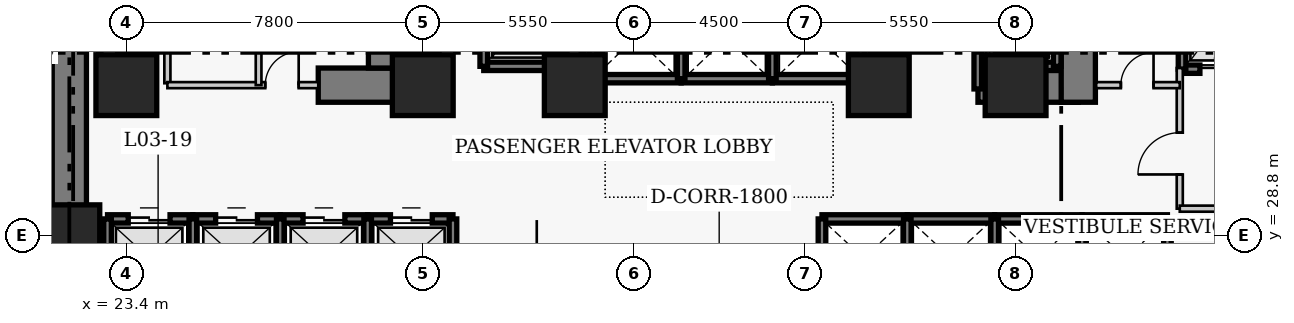
"""IFC4 building model, lengths in metres.
Left out: names, types, materials, properties, quantities, classifications, styles, units other than length and angle.
Written with IfcOpenShell. Run it as: python <this file> out.ifc"""

import sys

from ifc_helpers import new_model, si_unit, direction, frame, frame_2d, origin, origin_2d, place, context, subcontext, project, spatial, rectangle, extrude, element, fill, save


model = new_model("IFC4")
c1 = context("Model", 3, precision=1e-05, world=origin(), true_north=direction((0.0, 1.0)))
c2 = subcontext(c1, "Body", "Model", "MODEL_VIEW")
j1 = project(units=[si_unit("LENGTHUNIT", "METRE"), si_unit("PLANEANGLEUNIT", "RADIAN")], contexts=[c1])
p1 = place(None, origin())
s1 = spatial("IfcSite", under=j1, at=p1, CompositionType="ELEMENT")
p2 = place(p1, origin())
s2 = spatial("IfcBuilding", under=s1, at=p2, CompositionType="ELEMENT")
p3 = place(p2, frame((0.0, 0.0, 15.8)))
s3 = spatial("IfcBuildingStorey", under=s2, at=p3, CompositionType="ELEMENT", Elevation=15.8)
p4 = place(p3, frame((21.9, 27.05, 0.0), z_axis=(0.0, 0.0, 1.0), x_axis=(0.0, 1.0, 0.0)))
e1 = element("IfcWall", 1, at=p4, inside=s3, PredefinedType="SHEAR", context=c2, shape_type="SweptSolid", body=[
    extrude(rectangle(XDim=13.72, YDim=0.9, at=frame_2d((6.86, 0.0))), origin(), (0.0, 0.0, 1.0), 5.0),
])
p5 = place(p3, frame((28.45, 32.75, 0.0), z_axis=(0.0, 0.0, 1.0), x_axis=(1.0, 0.0, 0.0)))
e2 = element("IfcWall", 2, at=p5, inside=s3, PredefinedType="SHEAR", context=c2, shape_type="SweptSolid", body=[
    extrude(rectangle(XDim=2.4, YDim=0.9, at=frame_2d((1.2, 0.0))), origin(), (0.0, 0.0, 1.0), 5.0),
])
p6 = place(p3, frame((45.81, 32.75, 0.0), z_axis=(0.0, 0.0, 1.0), x_axis=(1.0, 0.0, 0.0)))
e3 = element("IfcWall", 3, at=p6, inside=s3, PredefinedType="SHEAR", context=c2, shape_type="SweptSolid", body=[
    extrude(rectangle(XDim=2.64, YDim=0.9, at=frame_2d((1.32, 0.0))), origin(), (0.0, 0.0, 1.0), 5.0),
])
p7 = place(p3, frame((30.22, 33.2, 0.0), z_axis=(0.0, 0.0, 1.0), x_axis=(0.0, 1.0, 0.0)))
e4 = element("IfcWall", 4, at=p7, inside=s3, PredefinedType="SHEAR", context=c2, shape_type="SweptSolid", body=[
    extrude(rectangle(XDim=7.12, YDim=0.9, at=frame_2d((3.56, 0.0))), origin(), (0.0, 0.0, 1.0), 5.0),
])
p8 = place(p3, frame((48.45, 32.3, 0.0), z_axis=(0.0, 0.0, 1.0), x_axis=(0.0, 1.0, 0.0)))
e5 = element("IfcWall", 5, at=p8, inside=s3, PredefinedType="SHEAR", context=c2, shape_type="SweptSolid", body=[
    extrude(rectangle(XDim=8.02, YDim=0.9, at=frame_2d((4.01, 0.0))), origin(), (0.0, 0.0, 1.0), 5.0),
])
p9 = place(p8, frame((5.9, 0.0, 0.0)))
e6 = element("IfcOpeningElement", 6, at=p9, cuts=e5, PredefinedType="OPENING", context=c2, shape_type="SweptSolid", body=[
    extrude(rectangle(XDim=1.1, YDim=2.15, at=frame_2d((0.55, 1.075))), frame((0.0, 0.46, 0.0), z_axis=(0.0, -1.0, 0.0), x_axis=(1.0, 0.0, 0.0)), (0.0, 0.0, 1.0), 0.92),
])
for number, where, z_axis, x_axis in (
    (7, (21.9, 28.8, 0.0), (0.0, 0.0, 1.0), (1.0, 0.0, 0.0)),
    (8, (23.4, 32.75, 0.0), (0.0, 0.0, 1.0), (1.0, 0.0, 0.0)),
    (9, (31.2, 32.75, 0.0), (0.0, 0.0, 1.0), (1.0, 0.0, 0.0)),
    (10, (35.2, 32.75, 0.0), (0.0, 0.0, 1.0), (1.0, 0.0, 0.0)),
    (11, (43.2, 32.75, 0.0), (0.0, 0.0, 1.0), (1.0, 0.0, 0.0)),
    (12, (46.8, 32.75, 0.0), (0.0, 0.0, 1.0), (1.0, 0.0, 0.0)),
):
    element("IfcColumn", number, at=place(p3, frame(where, z_axis=z_axis, x_axis=x_axis)), inside=s3, PredefinedType="COLUMN", context=c2, shape_type="SweptSolid", body=[
        extrude(rectangle(XDim=1.6, YDim=1.6, at=origin_2d()), origin(), (0.0, 0.0, 1.0), 5.0),
    ])
p10 = place(p3, frame((22.905, 29.23, 0.0), z_axis=(0.0, 0.0, 1.0), x_axis=(1.0, 0.0, 0.0)))
e13 = element("IfcWall", 13, at=p10, inside=s3, PredefinedType="SHEAR", context=c2, shape_type="SweptSolid", body=[
    extrude(rectangle(XDim=2.245, YDim=0.22, at=frame_2d((1.123, 0.0))), origin(), (0.0, 0.0, 1.0), 5.0),
])
p11 = place(p10, frame((0.545, 0.0, 0.0)))
e14 = element("IfcOpeningElement", 14, at=p11, cuts=e13, PredefinedType="OPENING", context=c2, shape_type="SweptSolid", body=[
    extrude(rectangle(XDim=1.1, YDim=2.15, at=frame_2d((0.55, 1.075))), frame((0.0, 0.12, 0.0), z_axis=(0.0, -1.0, 0.0), x_axis=(1.0, 0.0, 0.0)), (0.0, 0.0, 1.0), 0.24),
])
p12 = place(p3, frame((22.905, 27.17, 0.0), z_axis=(0.0, 0.0, 1.0), x_axis=(0.0, 1.0, 0.0)))
e15 = element("IfcWall", 15, at=p12, inside=s3, PredefinedType="SHEAR", context=c2, shape_type="SweptSolid", body=[
    extrude(rectangle(XDim=2.06, YDim=0.2, at=frame_2d((1.03, 0.0))), origin(), (0.0, 0.0, 1.0), 5.0),
])
p13 = place(p3, frame((25.15, 29.23, 0.0), z_axis=(0.0, 0.0, 1.0), x_axis=(1.0, 0.0, 0.0)))
e16 = element("IfcWall", 16, at=p13, inside=s3, PredefinedType="SHEAR", context=c2, shape_type="SweptSolid", body=[
    extrude(rectangle(XDim=2.3, YDim=0.22, at=frame_2d((1.15, 0.0))), origin(), (0.0, 0.0, 1.0), 5.0),
])
p14 = place(p13, frame((0.6, 0.0, 0.0)))
e17 = element("IfcOpeningElement", 17, at=p14, cuts=e16, PredefinedType="OPENING", context=c2, shape_type="SweptSolid", body=[
    extrude(rectangle(XDim=1.1, YDim=2.15, at=frame_2d((0.55, 1.075))), frame((0.0, 0.12, 0.0), z_axis=(0.0, -1.0, 0.0), x_axis=(1.0, 0.0, 0.0)), (0.0, 0.0, 1.0), 0.24),
])
p15 = place(p3, frame((25.15, 27.17, 0.0), z_axis=(0.0, 0.0, 1.0), x_axis=(0.0, 1.0, 0.0)))
e18 = element("IfcWall", 18, at=p15, inside=s3, PredefinedType="SHEAR", context=c2, shape_type="SweptSolid", body=[
    extrude(rectangle(XDim=2.06, YDim=0.2, at=frame_2d((1.03, 0.0))), origin(), (0.0, 0.0, 1.0), 5.0),
])
p16 = place(p3, frame((27.45, 29.23, 0.0), z_axis=(0.0, 0.0, 1.0), x_axis=(1.0, 0.0, 0.0)))
e19 = element("IfcWall", 19, at=p16, inside=s3, PredefinedType="SHEAR", context=c2, shape_type="SweptSolid", body=[
    extrude(rectangle(XDim=2.3, YDim=0.22, at=frame_2d((1.15, 0.0))), origin(), (0.0, 0.0, 1.0), 5.0),
])
p17 = place(p16, frame((0.6, 0.0, 0.0)))
e20 = element("IfcOpeningElement", 20, at=p17, cuts=e19, PredefinedType="OPENING", context=c2, shape_type="SweptSolid", body=[
    extrude(rectangle(XDim=1.1, YDim=2.15, at=frame_2d((0.55, 1.075))), frame((0.0, 0.12, 0.0), z_axis=(0.0, -1.0, 0.0), x_axis=(1.0, 0.0, 0.0)), (0.0, 0.0, 1.0), 0.24),
])
p18 = place(p3, frame((27.45, 27.17, 0.0), z_axis=(0.0, 0.0, 1.0), x_axis=(0.0, 1.0, 0.0)))
e21 = element("IfcWall", 21, at=p18, inside=s3, PredefinedType="SHEAR", context=c2, shape_type="SweptSolid", body=[
    extrude(rectangle(XDim=2.06, YDim=0.2, at=frame_2d((1.03, 0.0))), origin(), (0.0, 0.0, 1.0), 5.0),
])
p19 = place(p3, frame((29.75, 29.23, 0.0), z_axis=(0.0, 0.0, 1.0), x_axis=(1.0, 0.0, 0.0)))
e22 = element("IfcWall", 22, at=p19, inside=s3, PredefinedType="SHEAR", context=c2, shape_type="SweptSolid", body=[
    extrude(rectangle(XDim=2.245, YDim=0.22, at=frame_2d((1.123, 0.0))), origin(), (0.0, 0.0, 1.0), 5.0),
])
p20 = place(p19, frame((0.6, 0.0, 0.0)))
e23 = element("IfcOpeningElement", 23, at=p20, cuts=e22, PredefinedType="OPENING", context=c2, shape_type="SweptSolid", body=[
    extrude(rectangle(XDim=1.1, YDim=2.15, at=frame_2d((0.55, 1.075))), frame((0.0, 0.12, 0.0), z_axis=(0.0, -1.0, 0.0), x_axis=(1.0, 0.0, 0.0)), (0.0, 0.0, 1.0), 0.24),
])
for number, where, z_axis, x_axis in (
    (24, (29.75, 27.17, 0.0), (0.0, 0.0, 1.0), (0.0, 1.0, 0.0)),
    (25, (31.995, 27.17, 0.0), (0.0, 0.0, 1.0), (0.0, 1.0, 0.0)),
):
    element("IfcWall", number, at=place(p3, frame(where, z_axis=z_axis, x_axis=x_axis)), inside=s3, PredefinedType="SHEAR", context=c2, shape_type="SweptSolid", body=[
        extrude(rectangle(XDim=2.06, YDim=0.2, at=frame_2d((1.03, 0.0))), origin(), (0.0, 0.0, 1.0), 5.0),
    ])
p21 = place(p3, frame((41.705, 29.23, 0.0), z_axis=(0.0, 0.0, 1.0), x_axis=(1.0, 0.0, 0.0)))
e26 = element("IfcWall", 26, at=p21, inside=s3, PredefinedType="SHEAR", context=c2, shape_type="SweptSolid", body=[
    extrude(rectangle(XDim=2.245, YDim=0.22, at=frame_2d((1.123, 0.0))), origin(), (0.0, 0.0, 1.0), 5.0),
])
p22 = place(p3, frame((41.705, 27.17, 0.0), z_axis=(0.0, 0.0, 1.0), x_axis=(0.0, 1.0, 0.0)))
e27 = element("IfcWall", 27, at=p22, inside=s3, PredefinedType="SHEAR", context=c2, shape_type="SweptSolid", body=[
    extrude(rectangle(XDim=2.06, YDim=0.2, at=frame_2d((1.03, 0.0))), origin(), (0.0, 0.0, 1.0), 5.0),
])
p23 = place(p3, frame((43.95, 29.23, 0.0), z_axis=(0.0, 0.0, 1.0), x_axis=(1.0, 0.0, 0.0)))
e28 = element("IfcWall", 28, at=p23, inside=s3, PredefinedType="SHEAR", context=c2, shape_type="SweptSolid", body=[
    extrude(rectangle(XDim=2.3, YDim=0.22, at=frame_2d((1.15, 0.0))), origin(), (0.0, 0.0, 1.0), 5.0),
])
p24 = place(p3, frame((43.95, 27.17, 0.0), z_axis=(0.0, 0.0, 1.0), x_axis=(0.0, 1.0, 0.0)))
e29 = element("IfcWall", 29, at=p24, inside=s3, PredefinedType="SHEAR", context=c2, shape_type="SweptSolid", body=[
    extrude(rectangle(XDim=2.06, YDim=0.2, at=frame_2d((1.03, 0.0))), origin(), (0.0, 0.0, 1.0), 5.0),
])
p25 = place(p3, frame((46.25, 29.23, 0.0), z_axis=(0.0, 0.0, 1.0), x_axis=(1.0, 0.0, 0.0)))
e30 = element("IfcWall", 30, at=p25, inside=s3, PredefinedType="SHEAR", context=c2, shape_type="SweptSolid", body=[
    extrude(rectangle(XDim=2.3, YDim=0.22, at=frame_2d((1.15, 0.0))), origin(), (0.0, 0.0, 1.0), 5.0),
])
p26 = place(p3, frame((46.25, 27.17, 0.0), z_axis=(0.0, 0.0, 1.0), x_axis=(0.0, 1.0, 0.0)))
e31 = element("IfcWall", 31, at=p26, inside=s3, PredefinedType="SHEAR", context=c2, shape_type="SweptSolid", body=[
    extrude(rectangle(XDim=2.06, YDim=0.2, at=frame_2d((1.03, 0.0))), origin(), (0.0, 0.0, 1.0), 5.0),
])
p27 = place(p3, frame((48.55, 29.23, 0.0), z_axis=(0.0, 0.0, 1.0), x_axis=(1.0, 0.0, 0.0)))
e32 = element("IfcWall", 32, at=p27, inside=s3, PredefinedType="SHEAR", context=c2, shape_type="SweptSolid", body=[
    extrude(rectangle(XDim=2.245, YDim=0.22, at=frame_2d((1.123, 0.0))), origin(), (0.0, 0.0, 1.0), 5.0),
])
for number, where, z_axis, x_axis in (
    (33, (48.55, 27.17, 0.0), (0.0, 0.0, 1.0), (0.0, 1.0, 0.0)),
    (34, (50.795, 27.17, 0.0), (0.0, 0.0, 1.0), (0.0, 1.0, 0.0)),
):
    element("IfcWall", number, at=place(p3, frame(where, z_axis=z_axis, x_axis=x_axis)), inside=s3, PredefinedType="SHEAR", context=c2, shape_type="SweptSolid", body=[
        extrude(rectangle(XDim=2.06, YDim=0.2, at=frame_2d((1.03, 0.0))), origin(), (0.0, 0.0, 1.0), 5.0),
    ])
p28 = place(p3, frame((35.68, 32.92, 0.0), z_axis=(0.0, 0.0, 1.0), x_axis=(1.0, 0.0, 0.0)))
e35 = element("IfcWall", 35, at=p28, inside=s3, PredefinedType="SHEAR", context=c2, shape_type="SweptSolid", body=[
    extrude(rectangle(XDim=2.32, YDim=0.22, at=frame_2d((1.16, 0.0))), origin(), (0.0, 0.0, 1.0), 5.0),
])
p29 = place(p3, frame((35.68, 32.92, 0.0), z_axis=(0.0, 0.0, 1.0), x_axis=(0.0, 1.0, 0.0)))
e36 = element("IfcWall", 36, at=p29, inside=s3, PredefinedType="SHEAR", context=c2, shape_type="SweptSolid", body=[
    extrude(rectangle(XDim=2.16, YDim=0.2, at=frame_2d((1.08, 0.0))), origin(), (0.0, 0.0, 1.0), 5.0),
])
p30 = place(p3, frame((38.0, 32.92, 0.0), z_axis=(0.0, 0.0, 1.0), x_axis=(1.0, 0.0, 0.0)))
e37 = element("IfcWall", 37, at=p30, inside=s3, PredefinedType="SHEAR", context=c2, shape_type="SweptSolid", body=[
    extrude(rectangle(XDim=2.4, YDim=0.22, at=frame_2d((1.2, 0.0))), origin(), (0.0, 0.0, 1.0), 5.0),
])
p31 = place(p3, frame((38.0, 32.92, 0.0), z_axis=(0.0, 0.0, 1.0), x_axis=(0.0, 1.0, 0.0)))
e38 = element("IfcWall", 38, at=p31, inside=s3, PredefinedType="SHEAR", context=c2, shape_type="SweptSolid", body=[
    extrude(rectangle(XDim=2.16, YDim=0.2, at=frame_2d((1.08, 0.0))), origin(), (0.0, 0.0, 1.0), 5.0),
])
p32 = place(p3, frame((40.4, 32.92, 0.0), z_axis=(0.0, 0.0, 1.0), x_axis=(1.0, 0.0, 0.0)))
e39 = element("IfcWall", 39, at=p32, inside=s3, PredefinedType="SHEAR", context=c2, shape_type="SweptSolid", body=[
    extrude(rectangle(XDim=2.32, YDim=0.22, at=frame_2d((1.16, 0.0))), origin(), (0.0, 0.0, 1.0), 5.0),
])
for number, where, z_axis, x_axis in (
    (40, (40.4, 32.92, 0.0), (0.0, 0.0, 1.0), (0.0, 1.0, 0.0)),
    (41, (42.72, 32.92, 0.0), (0.0, 0.0, 1.0), (0.0, 1.0, 0.0)),
):
    element("IfcWall", number, at=place(p3, frame(where, z_axis=z_axis, x_axis=x_axis)), inside=s3, PredefinedType="SHEAR", context=c2, shape_type="SweptSolid", body=[
        extrude(rectangle(XDim=2.16, YDim=0.2, at=frame_2d((1.08, 0.0))), origin(), (0.0, 0.0, 1.0), 5.0),
    ])
p33 = place(p3, frame((51.18, 33.17, 0.0), z_axis=(0.0, 0.0, 1.0), x_axis=(1.0, 0.0, 0.0)))
e42 = element("IfcWall", 42, at=p33, inside=s3, PredefinedType="SHEAR", context=c2, shape_type="SweptSolid", body=[
    extrude(rectangle(XDim=2.42, YDim=0.22, at=frame_2d((1.21, 0.0))), origin(), (0.0, 0.0, 1.0), 5.0),
])
p34 = place(p33, frame((0.47, 0.0, 0.0)))
e43 = element("IfcOpeningElement", 43, at=p34, cuts=e42, PredefinedType="OPENING", context=c2, shape_type="SweptSolid", body=[
    extrude(rectangle(XDim=1.3, YDim=2.15, at=frame_2d((0.65, 1.075))), frame((0.0, 0.12, 0.0), z_axis=(0.0, -1.0, 0.0), x_axis=(1.0, 0.0, 0.0)), (0.0, 0.0, 1.0), 0.24),
])
p35 = place(p3, frame((51.18, 33.17, 0.0), z_axis=(0.0, 0.0, 1.0), x_axis=(0.0, 1.0, 0.0)))
e44 = element("IfcWall", 44, at=p35, inside=s3, PredefinedType="SHEAR", context=c2, shape_type="SweptSolid", body=[
    extrude(rectangle(XDim=2.86, YDim=0.2, at=frame_2d((1.43, 0.0))), origin(), (0.0, 0.0, 1.0), 5.0),
])
p36 = place(p3, frame((32.805, 33.245, 0.0), z_axis=(0.0, 0.0, 1.0), x_axis=(1.0, 0.0, 0.0)))
e45 = element("IfcWall", 45, at=p36, inside=s3, PredefinedType="SHEAR", context=c2, shape_type="SweptSolid", body=[
    extrude(rectangle(XDim=2.09, YDim=0.22, at=frame_2d((1.045, 0.0))), origin(), (0.0, 0.0, 1.0), 5.0),
])
for number, where, z_axis, x_axis in (
    (46, (32.805, 33.245, 0.0), (0.0, 0.0, 1.0), (0.0, 1.0, 0.0)),
    (47, (34.895, 33.245, 0.0), (0.0, 0.0, 1.0), (0.0, 1.0, 0.0)),
):
    element("IfcWall", number, at=place(p3, frame(where, z_axis=z_axis, x_axis=x_axis)), inside=s3, PredefinedType="SHEAR", context=c2, shape_type="SweptSolid", body=[
        extrude(rectangle(XDim=2.91, YDim=0.2, at=frame_2d((1.455, 0.0))), origin(), (0.0, 0.0, 1.0), 5.0),
    ])
p37 = place(p3, frame((45.805, 33.245, 0.0), z_axis=(0.0, 0.0, 1.0), x_axis=(1.0, 0.0, 0.0)))
e48 = element("IfcWall", 48, at=p37, inside=s3, PredefinedType="SHEAR", context=c2, shape_type="SweptSolid", body=[
    extrude(rectangle(XDim=2.09, YDim=0.22, at=frame_2d((1.045, 0.0))), origin(), (0.0, 0.0, 1.0), 5.0),
])
p38 = place(p3, frame((45.805, 32.65, 0.0), z_axis=(0.0, 0.0, 1.0), x_axis=(0.0, 1.0, 0.0)))
e49 = element("IfcWall", 49, at=p38, inside=s3, PredefinedType="SHEAR", context=c2, shape_type="SweptSolid", body=[
    extrude(rectangle(XDim=3.505, YDim=0.2, at=frame_2d((1.752, 0.0))), origin(), (0.0, 0.0, 1.0), 5.0),
])
p39 = place(p3, frame((47.895, 33.245, 0.0), z_axis=(0.0, 0.0, 1.0), x_axis=(0.0, 1.0, 0.0)))
e50 = element("IfcWall", 50, at=p39, inside=s3, PredefinedType="SHEAR", context=c2, shape_type="SweptSolid", body=[
    extrude(rectangle(XDim=2.91, YDim=0.2, at=frame_2d((1.455, 0.0))), origin(), (0.0, 0.0, 1.0), 5.0),
])
p40 = place(p3, frame((24.48, 32.8, 0.0), z_axis=(0.0, 0.0, 1.0), x_axis=(0.0, 1.0, 0.0)))
e51 = element("IfcWall", 51, at=p40, inside=s3, PredefinedType="PARTITIONING", context=c2, shape_type="SweptSolid", body=[
    extrude(rectangle(XDim=3.57, YDim=0.16, at=frame_2d((1.785, 0.0))), origin(), (0.0, 0.0, 1.0), 4.58),
])
p41 = place(p40, frame((1.604, 0.0, 0.0)))
e52 = element("IfcOpeningElement", 52, at=p41, cuts=e51, PredefinedType="OPENING", context=c2, shape_type="SweptSolid", body=[
    extrude(rectangle(XDim=0.9, YDim=2.1, at=frame_2d((0.45, 1.05))), frame((0.0, 0.09, 0.0), z_axis=(0.0, -1.0, 0.0), x_axis=(1.0, 0.0, 0.0)), (0.0, 0.0, 1.0), 0.18),
])
p42 = place(p3, frame((51.12, 29.5, 0.0), z_axis=(0.0, 0.0, 1.0), x_axis=(0.0, 1.0, 0.0)))
e53 = element("IfcWall", 53, at=p42, inside=s3, PredefinedType="PARTITIONING", context=c2, shape_type="SweptSolid", body=[
    extrude(rectangle(XDim=3.7, YDim=0.16, at=frame_2d((1.85, 0.0))), origin(), (0.0, 0.0, 1.0), 4.58),
])
p43 = place(p42, frame((0.9, 0.0, 0.0)))
e54 = element("IfcOpeningElement", 54, at=p43, cuts=e53, PredefinedType="OPENING", context=c2, shape_type="SweptSolid", body=[
    extrude(rectangle(XDim=1.1, YDim=2.15, at=frame_2d((0.55, 1.075))), frame((0.0, 0.09, 0.0), z_axis=(0.0, -1.0, 0.0), x_axis=(1.0, 0.0, 0.0)), (0.0, 0.0, 1.0), 0.18),
])
p44 = place(p3, frame((51.12, 29.5, 0.0), z_axis=(0.0, 0.0, 1.0), x_axis=(1.0, 0.0, 0.0)))
e55 = element("IfcWall", 55, at=p44, inside=s3, PredefinedType="PARTITIONING", context=c2, shape_type="SweptSolid", body=[
    extrude(rectangle(XDim=5.63, YDim=0.16, at=frame_2d((2.815, 0.0))), origin(), (0.0, 0.0, 1.0), 4.58),
])
p45 = place(p3, frame((24.48, 32.75, 0.0), z_axis=(0.0, 0.0, 1.0), x_axis=(1.0, 0.0, 0.0)))
e56 = element("IfcWall", 56, at=p45, inside=s3, PredefinedType="PARTITIONING", context=c2, shape_type="SweptSolid", body=[
    extrude(rectangle(XDim=3.97, YDim=0.16, at=frame_2d((1.985, 0.0))), origin(), (0.0, 0.0, 1.0), 4.58),
])
p46 = place(p45, frame((2.575, 0.0, 0.0)))
e57 = element("IfcOpeningElement", 57, at=p46, cuts=e56, PredefinedType="OPENING", context=c2, shape_type="SweptSolid", body=[
    extrude(rectangle(XDim=0.88, YDim=2.05, at=frame_2d((0.44, 1.025))), frame((0.0, 0.09, 0.0), z_axis=(0.0, -1.0, 0.0), x_axis=(1.0, 0.0, 0.0)), (0.0, 0.0, 1.0), 0.18),
])
p47 = place(p3, frame((48.92, 32.75, 0.0), z_axis=(0.0, 0.0, 1.0), x_axis=(1.0, 0.0, 0.0)))
e58 = element("IfcWall", 58, at=p47, inside=s3, PredefinedType="PARTITIONING", context=c2, shape_type="SweptSolid", body=[
    extrude(rectangle(XDim=2.2, YDim=0.16, at=frame_2d((1.1, 0.0))), origin(), (0.0, 0.0, 1.0), 4.58),
])
p48 = place(p47, frame((0.65, 0.0, 0.0)))
e59 = element("IfcOpeningElement", 59, at=p48, cuts=e58, PredefinedType="OPENING", context=c2, shape_type="SweptSolid", body=[
    extrude(rectangle(XDim=0.86, YDim=2.05, at=frame_2d((0.43, 1.025))), frame((0.0, 0.09, 0.0), z_axis=(0.0, -1.0, 0.0), x_axis=(1.0, 0.0, 0.0)), (0.0, 0.0, 1.0), 0.18),
])
p49 = place(p3, frame((26.88, 32.75, 0.0), z_axis=(0.0, 0.0, 1.0), x_axis=(0.0, 1.0, 0.0)))
e60 = element("IfcWall", 60, at=p49, inside=s3, PredefinedType="PARTITIONING", context=c2, shape_type="SweptSolid", body=[
    extrude(rectangle(XDim=3.62, YDim=0.15, at=frame_2d((1.81, 0.0))), origin(), (0.0, 0.0, 1.0), 4.58),
])
p50 = place(p11, origin())
e61 = element("IfcDoor", 61, at=p50, inside=s3, OperationType="DOUBLE_DOOR_SLIDING", PredefinedType="DOOR", context=c2, shape_type="SweptSolid", body=[
    extrude(rectangle(XDim=1.1, YDim=2.15, at=frame_2d((0.55, 1.075))), frame((0.0, 0.025, 0.0), z_axis=(0.0, -1.0, 0.0), x_axis=(1.0, 0.0, 0.0)), (0.0, 0.0, 1.0), 0.05),
])
fill(e14, e61)
p51 = place(p14, origin())
e62 = element("IfcDoor", 62, at=p51, inside=s3, OperationType="DOUBLE_DOOR_SLIDING", PredefinedType="DOOR", context=c2, shape_type="SweptSolid", body=[
    extrude(rectangle(XDim=1.1, YDim=2.15, at=frame_2d((0.55, 1.075))), frame((0.0, 0.025, 0.0), z_axis=(0.0, -1.0, 0.0), x_axis=(1.0, 0.0, 0.0)), (0.0, 0.0, 1.0), 0.05),
])
fill(e17, e62)
p52 = place(p17, origin())
e63 = element("IfcDoor", 63, at=p52, inside=s3, OperationType="DOUBLE_DOOR_SLIDING", PredefinedType="DOOR", context=c2, shape_type="SweptSolid", body=[
    extrude(rectangle(XDim=1.1, YDim=2.15, at=frame_2d((0.55, 1.075))), frame((0.0, 0.025, 0.0), z_axis=(0.0, -1.0, 0.0), x_axis=(1.0, 0.0, 0.0)), (0.0, 0.0, 1.0), 0.05),
])
fill(e20, e63)
p53 = place(p20, origin())
e64 = element("IfcDoor", 64, at=p53, inside=s3, OperationType="DOUBLE_DOOR_SLIDING", PredefinedType="DOOR", context=c2, shape_type="SweptSolid", body=[
    extrude(rectangle(XDim=1.1, YDim=2.15, at=frame_2d((0.55, 1.075))), frame((0.0, 0.025, 0.0), z_axis=(0.0, -1.0, 0.0), x_axis=(1.0, 0.0, 0.0)), (0.0, 0.0, 1.0), 0.05),
])
fill(e23, e64)
p54 = place(p34, origin())
e65 = element("IfcDoor", 65, at=p54, inside=s3, OperationType="DOUBLE_DOOR_SLIDING", PredefinedType="DOOR", context=c2, shape_type="SweptSolid", body=[
    extrude(rectangle(XDim=1.3, YDim=2.15, at=frame_2d((0.65, 1.075))), frame((0.0, 0.025, 0.0), z_axis=(0.0, -1.0, 0.0), x_axis=(1.0, 0.0, 0.0)), (0.0, 0.0, 1.0), 0.05),
])
fill(e43, e65)
p55 = place(p43, origin())
e66 = element("IfcDoor", 66, at=p55, inside=s3, OperationType="SINGLE_SWING_LEFT", PredefinedType="DOOR", context=c2, shape_type="SweptSolid", body=[
    extrude(rectangle(XDim=1.1, YDim=2.15, at=frame_2d((0.55, 1.075))), frame((0.0, 0.025, 0.0), z_axis=(0.0, -1.0, 0.0), x_axis=(1.0, 0.0, 0.0)), (0.0, 0.0, 1.0), 0.05),
])
fill(e54, e66)
p56 = place(p46, origin())
e67 = element("IfcDoor", 67, at=p56, inside=s3, OperationType="SINGLE_SWING_RIGHT", PredefinedType="DOOR", context=c2, shape_type="SweptSolid", body=[
    extrude(rectangle(XDim=0.88, YDim=2.05, at=frame_2d((0.44, 1.025))), frame((0.0, 0.025, 0.0), z_axis=(0.0, -1.0, 0.0), x_axis=(1.0, 0.0, 0.0)), (0.0, 0.0, 1.0), 0.05),
])
fill(e57, e67)
p57 = place(p48, origin())
e68 = element("IfcDoor", 68, at=p57, inside=s3, OperationType="SINGLE_SWING_RIGHT", PredefinedType="DOOR", context=c2, shape_type="SweptSolid", body=[
    extrude(rectangle(XDim=0.86, YDim=2.05, at=frame_2d((0.43, 1.025))), frame((0.0, 0.025, 0.0), z_axis=(0.0, -1.0, 0.0), x_axis=(1.0, 0.0, 0.0)), (0.0, 0.0, 1.0), 0.05),
])
fill(e59, e68)
save(model, sys.argv[1])
